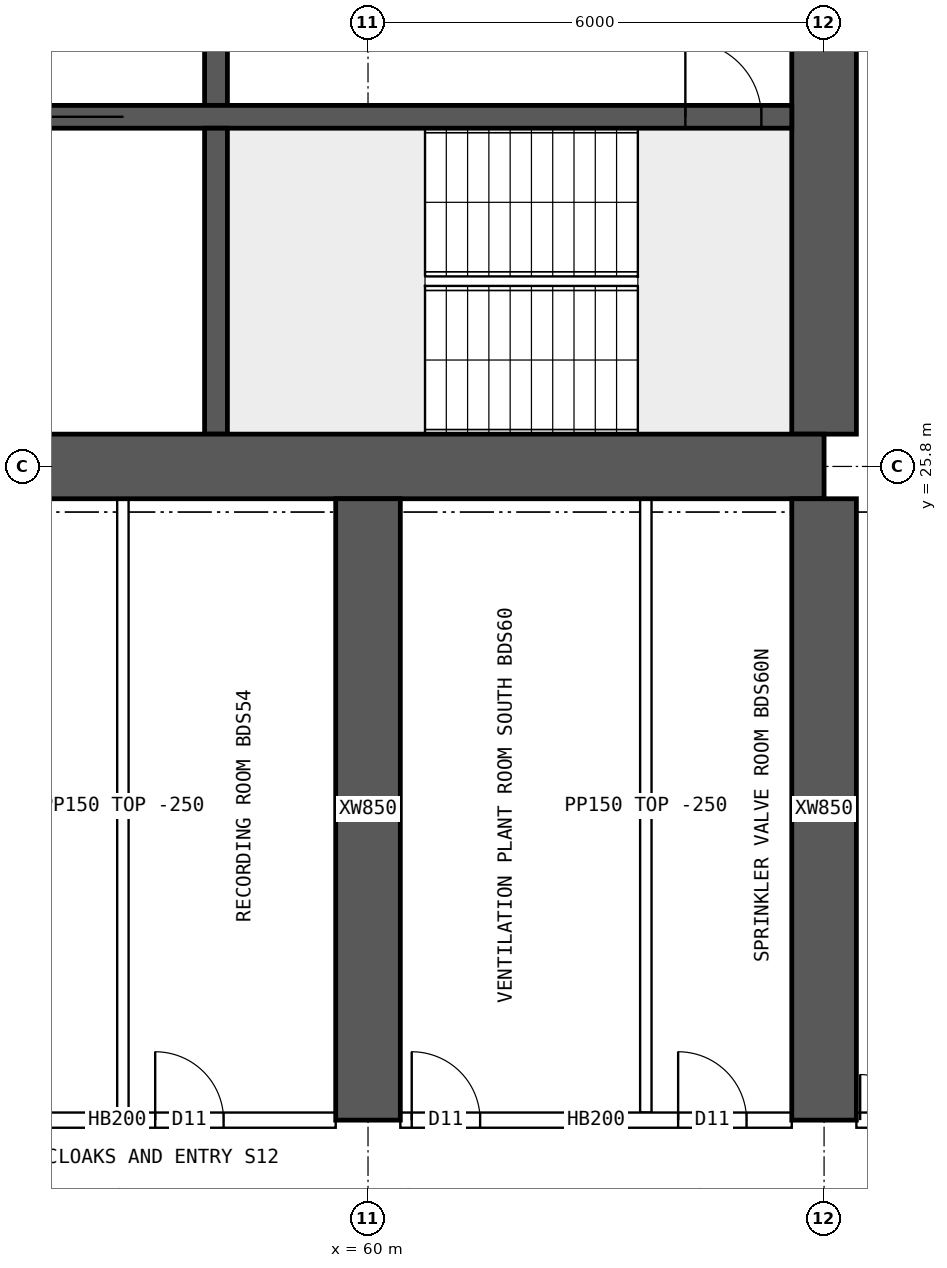
"""IFC4 building model, lengths in metres.
Left out: names, types, materials, properties, quantities, classifications, styles, units other than length and angle.
Written with IfcOpenShell. Run it as: python <this file> out.ifc"""

import sys

from ifc_helpers import new_model, si_unit, direction, frame, frame_2d, origin, place, context, subcontext, project, spatial, rectangle, extrude, element, fill, save


model = new_model("IFC4")
c1 = context("Model", 3, precision=1e-05, world=origin(), true_north=direction((0.0, 1.0)))
c2 = subcontext(c1, "Body", "Model", "MODEL_VIEW")
j1 = project(units=[si_unit("LENGTHUNIT", "METRE"), si_unit("PLANEANGLEUNIT", "RADIAN")], contexts=[c1])
p1 = place(None, origin())
s1 = spatial("IfcSite", under=j1, at=p1, CompositionType="ELEMENT")
p2 = place(p1, origin())
s2 = spatial("IfcBuilding", under=s1, at=p2, CompositionType="ELEMENT")
p3 = place(p2, frame((0.0, 0.0, 178.6)))
s3 = spatial("IfcBuildingStorey", under=s2, at=p3, CompositionType="ELEMENT", Elevation=178.6)
p4 = place(p3, frame((18.0, 25.8, 0.0), z_axis=(0.0, 0.0, 1.0), x_axis=(1.0, 0.0, 0.0)))
e1 = element("IfcWall", 1, at=p4, inside=s3, PredefinedType="SHEAR", context=c2, shape_type="SweptSolid", body=[
    extrude(rectangle(XDim=48.0, YDim=0.85, at=frame_2d((24.0, 0.0))), origin(), (0.0, 0.0, 1.0), 3.75),
])
p5 = place(p3, frame((66.0, 26.225, 0.0), z_axis=(0.0, 0.0, 1.0), x_axis=(0.0, 1.0, 0.0)))
e2 = element("IfcWall", 2, at=p5, inside=s3, PredefinedType="SHEAR", context=c2, shape_type="SweptSolid", body=[
    extrude(rectangle(XDim=11.55, YDim=0.85, at=frame_2d((5.775, 0.0))), origin(), (0.0, 0.0, 1.0), 3.75),
])
p6 = place(p5, frame((5.075, 0.0, 0.0)))
e3 = element("IfcOpeningElement", 3, at=p6, cuts=e2, PredefinedType="OPENING", context=c2, shape_type="SweptSolid", body=[
    extrude(rectangle(XDim=1.2, YDim=2.1, at=frame_2d((0.6, 1.05))), frame((0.0, 0.435, 0.0), z_axis=(0.0, -1.0, 0.0), x_axis=(1.0, 0.0, 0.0)), (0.0, 0.0, 1.0), 0.87),
])
p7 = place(p3, frame((18.425, 30.4, 0.0), z_axis=(0.0, 0.0, 1.0), x_axis=(1.0, 0.0, 0.0)))
e4 = element("IfcWall", 4, at=p7, inside=s3, PredefinedType="SHEAR", context=c2, shape_type="SweptSolid", body=[
    extrude(rectangle(XDim=47.15, YDim=0.3, at=frame_2d((23.575, 0.0))), origin(), (0.0, 0.0, 1.0), 3.75),
])
p8 = place(p7, frame((0.4, 0.0, 0.0)))
e5 = element("IfcOpeningElement", 5, at=p8, cuts=e4, PredefinedType="OPENING", context=c2, shape_type="SweptSolid", body=[
    extrude(rectangle(XDim=1.0, YDim=2.1, at=frame_2d((0.5, 1.05))), frame((0.0, 0.16, 0.0), z_axis=(0.0, -1.0, 0.0), x_axis=(1.0, 0.0, 0.0)), (0.0, 0.0, 1.0), 0.32),
])
p9 = place(p7, frame((45.75, 0.0, 0.0)))
e6 = element("IfcOpeningElement", 6, at=p9, cuts=e4, PredefinedType="OPENING", context=c2, shape_type="SweptSolid", body=[
    extrude(rectangle(XDim=1.0, YDim=2.1, at=frame_2d((0.5, 1.05))), frame((0.0, 0.16, 0.0), z_axis=(0.0, -1.0, 0.0), x_axis=(1.0, 0.0, 0.0)), (0.0, 0.0, 1.0), 0.32),
])
p10 = place(p7, frame((8.325, 0.0, 0.0)))
e7 = element("IfcOpeningElement", 7, at=p10, cuts=e4, PredefinedType="OPENING", context=c2, shape_type="SweptSolid", body=[
    extrude(rectangle(XDim=1.1, YDim=2.1, at=frame_2d((0.55, 1.05))), frame((0.0, 0.16, 0.0), z_axis=(0.0, -1.0, 0.0), x_axis=(1.0, 0.0, 0.0)), (0.0, 0.0, 1.0), 0.32),
])
p11 = place(p7, frame((10.925, 0.0, 0.0)))
e8 = element("IfcOpeningElement", 8, at=p11, cuts=e4, PredefinedType="OPENING", context=c2, shape_type="SweptSolid", body=[
    extrude(rectangle(XDim=1.1, YDim=2.1, at=frame_2d((0.55, 1.05))), frame((0.0, 0.16, 0.0), z_axis=(0.0, -1.0, 0.0), x_axis=(1.0, 0.0, 0.0)), (0.0, 0.0, 1.0), 0.32),
])
p12 = place(p7, frame((13.525, 0.0, 0.0)))
e9 = element("IfcOpeningElement", 9, at=p12, cuts=e4, PredefinedType="OPENING", context=c2, shape_type="SweptSolid", body=[
    extrude(rectangle(XDim=1.1, YDim=2.1, at=frame_2d((0.55, 1.05))), frame((0.0, 0.16, 0.0), z_axis=(0.0, -1.0, 0.0), x_axis=(1.0, 0.0, 0.0)), (0.0, 0.0, 1.0), 0.32),
])
p13 = place(p7, frame((16.125, 0.0, 0.0)))
e10 = element("IfcOpeningElement", 10, at=p13, cuts=e4, PredefinedType="OPENING", context=c2, shape_type="SweptSolid", body=[
    extrude(rectangle(XDim=1.1, YDim=2.1, at=frame_2d((0.55, 1.05))), frame((0.0, 0.16, 0.0), z_axis=(0.0, -1.0, 0.0), x_axis=(1.0, 0.0, 0.0)), (0.0, 0.0, 1.0), 0.32),
])
p14 = place(p7, frame((18.9, 0.0, 0.0)))
e11 = element("IfcOpeningElement", 11, at=p14, cuts=e4, PredefinedType="OPENING", context=c2, shape_type="SweptSolid", body=[
    extrude(rectangle(XDim=0.9, YDim=2.1, at=frame_2d((0.45, 1.05))), frame((0.0, 0.16, 0.0), z_axis=(0.0, -1.0, 0.0), x_axis=(1.0, 0.0, 0.0)), (0.0, 0.0, 1.0), 0.32),
])
p15 = place(p7, frame((30.192, 0.0, 0.0)))
e12 = element("IfcOpeningElement", 12, at=p15, cuts=e4, PredefinedType="OPENING", context=c2, shape_type="SweptSolid", body=[
    extrude(rectangle(XDim=1.1, YDim=2.1, at=frame_2d((0.55, 1.05))), frame((0.0, 0.16, 0.0), z_axis=(0.0, -1.0, 0.0), x_axis=(1.0, 0.0, 0.0)), (0.0, 0.0, 1.0), 0.32),
])
p16 = place(p7, frame((33.725, 0.0, 0.0)))
e13 = element("IfcOpeningElement", 13, at=p16, cuts=e4, PredefinedType="OPENING", context=c2, shape_type="SweptSolid", body=[
    extrude(rectangle(XDim=1.1, YDim=2.1, at=frame_2d((0.55, 1.05))), frame((0.0, 0.16, 0.0), z_axis=(0.0, -1.0, 0.0), x_axis=(1.0, 0.0, 0.0)), (0.0, 0.0, 1.0), 0.32),
])
p17 = place(p7, frame((37.258, 0.0, 0.0)))
e14 = element("IfcOpeningElement", 14, at=p17, cuts=e4, PredefinedType="OPENING", context=c2, shape_type="SweptSolid", body=[
    extrude(rectangle(XDim=1.1, YDim=2.1, at=frame_2d((0.55, 1.05))), frame((0.0, 0.16, 0.0), z_axis=(0.0, -1.0, 0.0), x_axis=(1.0, 0.0, 0.0)), (0.0, 0.0, 1.0), 0.32),
])
p18 = place(p3, frame((58.0, 26.225, 0.0), z_axis=(0.0, 0.0, 1.0), x_axis=(0.0, 1.0, 0.0)))
e15 = element("IfcWall", 15, at=p18, inside=s3, PredefinedType="SHEAR", context=c2, shape_type="SweptSolid", body=[
    extrude(rectangle(XDim=4.025, YDim=0.3, at=frame_2d((2.012, 0.0))), origin(), (0.0, 0.0, 1.0), 3.75),
])
p19 = place(p3, frame((58.0, 30.55, 0.0), z_axis=(0.0, 0.0, 1.0), x_axis=(0.0, 1.0, 0.0)))
e16 = element("IfcWall", 16, at=p19, inside=s3, PredefinedType="SHEAR", context=c2, shape_type="SweptSolid", body=[
    extrude(rectangle(XDim=3.9, YDim=0.3, at=frame_2d((1.95, 0.0))), origin(), (0.0, 0.0, 1.0), 3.75),
])
p20 = place(p19, frame((1.4, 0.0, 0.0)))
e17 = element("IfcOpeningElement", 17, at=p20, cuts=e16, PredefinedType="OPENING", context=c2, shape_type="SweptSolid", body=[
    extrude(rectangle(XDim=1.2, YDim=2.1, at=frame_2d((0.6, 1.05))), frame((0.0, 0.16, 0.0), z_axis=(0.0, -1.0, 0.0), x_axis=(1.0, 0.0, 0.0)), (0.0, 0.0, 1.0), 0.32),
])
for number, where, z_axis, x_axis in (
    (18, (60.0, 17.2, 0.0), (0.0, 0.0, 1.0), (0.0, 1.0, 0.0)),
    (19, (66.0, 17.2, 0.0), (0.0, 0.0, 1.0), (0.0, 1.0, 0.0)),
):
    element("IfcWall", number, at=place(p3, frame(where, z_axis=z_axis, x_axis=x_axis)), inside=s3, PredefinedType="SHEAR", context=c2, shape_type="SweptSolid", body=[
        extrude(rectangle(XDim=8.175, YDim=0.85, at=frame_2d((4.087, 0.0))), origin(), (0.0, 0.0, 1.0), 3.75),
    ])
p21 = place(p3, frame((54.425, 17.2, 0.0), z_axis=(0.0, 0.0, 1.0), x_axis=(1.0, 0.0, 0.0)))
e20 = element("IfcWall", 20, at=p21, inside=s3, PredefinedType="SOLIDWALL", context=c2, shape_type="SweptSolid", body=[
    extrude(rectangle(XDim=5.15, YDim=0.2, at=frame_2d((2.575, 0.0))), origin(), (0.0, 0.0, 1.0), 3.5),
])
p22 = place(p21, frame((0.35, 0.0, 0.0)))
e21 = element("IfcOpeningElement", 21, at=p22, cuts=e20, PredefinedType="OPENING", context=c2, shape_type="SweptSolid", body=[
    extrude(rectangle(XDim=0.9, YDim=2.1, at=frame_2d((0.45, 1.05))), frame((0.0, 0.11, 0.0), z_axis=(0.0, -1.0, 0.0), x_axis=(1.0, 0.0, 0.0)), (0.0, 0.0, 1.0), 0.22),
])
p23 = place(p21, frame((2.775, 0.0, 0.0)))
e22 = element("IfcOpeningElement", 22, at=p23, cuts=e20, PredefinedType="OPENING", context=c2, shape_type="SweptSolid", body=[
    extrude(rectangle(XDim=0.9, YDim=2.1, at=frame_2d((0.45, 1.05))), frame((0.0, 0.11, 0.0), z_axis=(0.0, -1.0, 0.0), x_axis=(1.0, 0.0, 0.0)), (0.0, 0.0, 1.0), 0.22),
])
p24 = place(p3, frame((60.425, 17.2, 0.0), z_axis=(0.0, 0.0, 1.0), x_axis=(1.0, 0.0, 0.0)))
e23 = element("IfcWall", 23, at=p24, inside=s3, PredefinedType="SOLIDWALL", context=c2, shape_type="SweptSolid", body=[
    extrude(rectangle(XDim=5.15, YDim=0.2, at=frame_2d((2.575, 0.0))), origin(), (0.0, 0.0, 1.0), 3.5),
])
p25 = place(p24, frame((0.15, 0.0, 0.0)))
e24 = element("IfcOpeningElement", 24, at=p25, cuts=e23, PredefinedType="OPENING", context=c2, shape_type="SweptSolid", body=[
    extrude(rectangle(XDim=0.9, YDim=2.1, at=frame_2d((0.45, 1.05))), frame((0.0, 0.11, 0.0), z_axis=(0.0, -1.0, 0.0), x_axis=(1.0, 0.0, 0.0)), (0.0, 0.0, 1.0), 0.22),
])
p26 = place(p24, frame((3.655, 0.0, 0.0)))
e25 = element("IfcOpeningElement", 25, at=p26, cuts=e23, PredefinedType="OPENING", context=c2, shape_type="SweptSolid", body=[
    extrude(rectangle(XDim=0.9, YDim=2.1, at=frame_2d((0.45, 1.05))), frame((0.0, 0.11, 0.0), z_axis=(0.0, -1.0, 0.0), x_axis=(1.0, 0.0, 0.0)), (0.0, 0.0, 1.0), 0.22),
])
p27 = place(p3, frame((66.425, 17.2, 0.0), z_axis=(0.0, 0.0, 1.0), x_axis=(1.0, 0.0, 0.0)))
e26 = element("IfcWall", 26, at=p27, inside=s3, PredefinedType="SOLIDWALL", context=c2, shape_type="SweptSolid", body=[
    extrude(rectangle(XDim=1.975, YDim=0.2, at=frame_2d((0.987, 0.0))), origin(), (0.0, 0.0, 1.0), 3.5),
])
p28 = place(p27, frame((0.05, 0.0, 0.0)))
e27 = element("IfcOpeningElement", 27, at=p28, cuts=e26, PredefinedType="OPENING", context=c2, shape_type="SweptSolid", body=[
    extrude(rectangle(XDim=1.2, YDim=2.1, at=frame_2d((0.6, 1.05))), frame((0.0, 0.11, 0.0), z_axis=(0.0, -1.0, 0.0), x_axis=(1.0, 0.0, 0.0)), (0.0, 0.0, 1.0), 0.22),
])
for number, where, z_axis, x_axis in (
    (28, (56.775, 17.3, 0.0), (0.0, 0.0, 1.0), (0.0, 1.0, 0.0)),
    (29, (63.655, 17.3, 0.0), (0.0, 0.0, 1.0), (0.0, 1.0, 0.0)),
):
    element("IfcWall", number, at=place(p3, frame(where, z_axis=z_axis, x_axis=x_axis)), inside=s3, PredefinedType="PARTITIONING", context=c2, shape_type="SweptSolid", body=[
        extrude(rectangle(XDim=8.075, YDim=0.15, at=frame_2d((4.038, 0.0))), origin(), (0.0, 0.0, 1.0), 3.5),
    ])
p29 = place(p9, origin())
e30 = element("IfcDoor", 30, at=p29, inside=s3, OperationType="SINGLE_SWING_LEFT", PredefinedType="DOOR", context=c2, shape_type="SweptSolid", body=[
    extrude(rectangle(XDim=1.0, YDim=2.1, at=frame_2d((0.5, 1.05))), frame((0.0, 0.025, 0.0), z_axis=(0.0, -1.0, 0.0), x_axis=(1.0, 0.0, 0.0)), (0.0, 0.0, 1.0), 0.05),
])
fill(e6, e30)
p30 = place(p17, origin())
e31 = element("IfcDoor", 31, at=p30, inside=s3, OperationType="DOUBLE_DOOR_SLIDING", PredefinedType="DOOR", context=c2, shape_type="SweptSolid", body=[
    extrude(rectangle(XDim=1.1, YDim=2.1, at=frame_2d((0.55, 1.05))), frame((0.0, 0.025, 0.0), z_axis=(0.0, -1.0, 0.0), x_axis=(1.0, 0.0, 0.0)), (0.0, 0.0, 1.0), 0.05),
])
fill(e14, e31)
p31 = place(p28, origin())
e32 = element("IfcDoor", 32, at=p31, inside=s3, OperationType="DOUBLE_DOOR_SINGLE_SWING", PredefinedType="DOOR", context=c2, shape_type="SweptSolid", body=[
    extrude(rectangle(XDim=1.2, YDim=2.1, at=frame_2d((0.6, 1.05))), frame((0.0, 0.025, 0.0), z_axis=(0.0, -1.0, 0.0), x_axis=(1.0, 0.0, 0.0)), (0.0, 0.0, 1.0), 0.05),
])
fill(e27, e32)
p32 = place(p23, origin())
e33 = element("IfcDoor", 33, at=p32, inside=s3, OperationType="SINGLE_SWING_LEFT", PredefinedType="DOOR", context=c2, shape_type="SweptSolid", body=[
    extrude(rectangle(XDim=0.9, YDim=2.1, at=frame_2d((0.45, 1.05))), frame((0.0, 0.025, 0.0), z_axis=(0.0, -1.0, 0.0), x_axis=(1.0, 0.0, 0.0)), (0.0, 0.0, 1.0), 0.05),
])
fill(e22, e33)
p33 = place(p25, origin())
e34 = element("IfcDoor", 34, at=p33, inside=s3, OperationType="SINGLE_SWING_LEFT", PredefinedType="DOOR", context=c2, shape_type="SweptSolid", body=[
    extrude(rectangle(XDim=0.9, YDim=2.1, at=frame_2d((0.45, 1.05))), frame((0.0, 0.025, 0.0), z_axis=(0.0, -1.0, 0.0), x_axis=(1.0, 0.0, 0.0)), (0.0, 0.0, 1.0), 0.05),
])
fill(e24, e34)
p34 = place(p26, origin())
e35 = element("IfcDoor", 35, at=p34, inside=s3, OperationType="SINGLE_SWING_LEFT", PredefinedType="DOOR", context=c2, shape_type="SweptSolid", body=[
    extrude(rectangle(XDim=0.9, YDim=2.1, at=frame_2d((0.45, 1.05))), frame((0.0, 0.025, 0.0), z_axis=(0.0, -1.0, 0.0), x_axis=(1.0, 0.0, 0.0)), (0.0, 0.0, 1.0), 0.05),
])
fill(e25, e35)
save(model, sys.argv[1])
